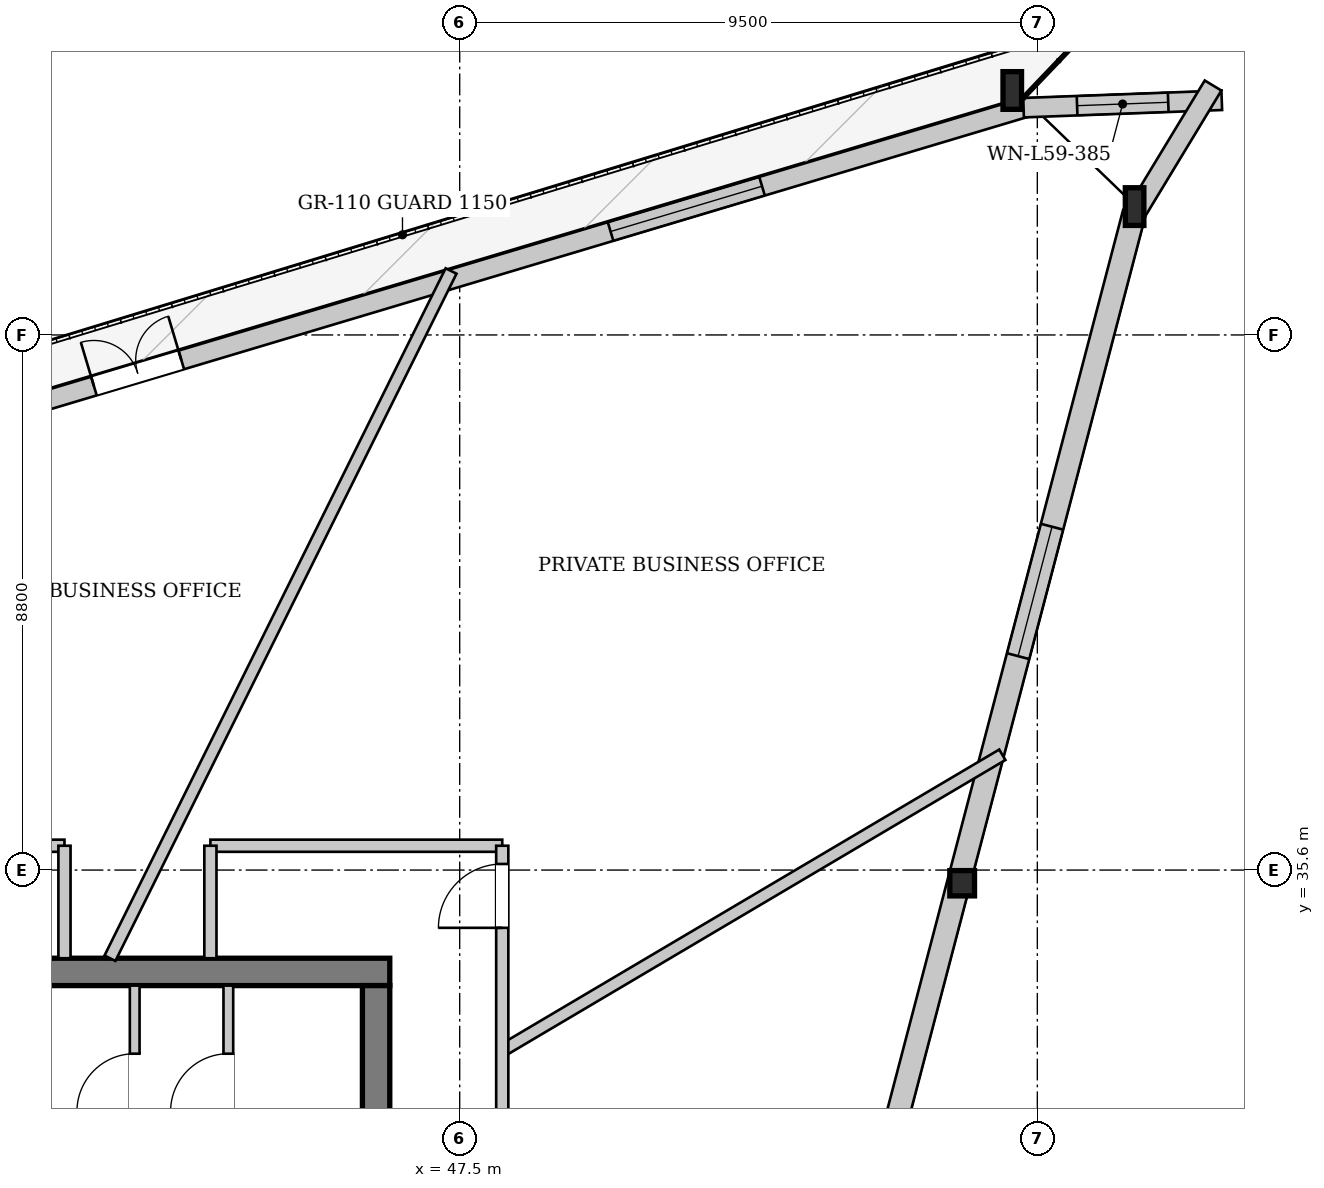
"""IFC4 building model, lengths in metres.
Left out: names, types, materials, properties, quantities, classifications, styles, units other than length and angle.
Written with IfcOpenShell. Run it as: python <this file> out.ifc"""

import sys

from ifc_helpers import new_model, si_unit, direction, frame, frame_2d, origin, origin_2d, place, context, subcontext, project, spatial, rectangle, i_section, extrude, source, transform, mapped, element, fill, save


model = new_model("IFC4")
c1 = context("Model", 3, precision=1e-05, world=origin(), true_north=direction((0.0, 1.0)))
c2 = subcontext(c1, "Body", "Model", "MODEL_VIEW")
j1 = project(units=[si_unit("LENGTHUNIT", "METRE"), si_unit("PLANEANGLEUNIT", "RADIAN")], contexts=[c1])
p1 = place(None, origin())
s1 = spatial("IfcSite", under=j1, at=p1, CompositionType="ELEMENT")
p2 = place(p1, origin())
s2 = spatial("IfcBuilding", under=s1, at=p2, CompositionType="ELEMENT")
p3 = place(p2, frame((0.0, 0.0, 223.8)))
s3 = spatial("IfcBuildingStorey", under=s2, at=p3, CompositionType="ELEMENT", Elevation=223.8)
m1 = source(origin(), c2, "Body", "SweptSolid", [
    extrude(i_section(OverallWidth=0.305, OverallDepth=0.62, WebThickness=0.021, FlangeThickness=0.04, at=origin_2d()), origin(), (0.0, 0.0, 1.0), 3.417),
])
p4 = place(p3, frame((58.778, 46.359, 0.0), z_axis=(-0.104447708162, 0.089016309418, 0.990538627676), x_axis=(-0.648645206746, -0.761090924769, 0.0)))
e1 = element("IfcColumn", 1, at=p4, inside=s3, PredefinedType="COLUMN", context=c2, shape_type="MappedRepresentation", body=[
    mapped(m1, transform((0.0, 0.0, 0.0), x_axis=(1.0, 0.0, 0.0), y_axis=(0.0, 1.0, 0.0), z_axis=(0.0, 0.0, 1.0), scale=1.0)),
])
m2 = source(origin(), c2, "Body", "SweptSolid", [
    extrude(i_section(OverallWidth=0.305, OverallDepth=0.62, WebThickness=0.021, FlangeThickness=0.04, at=origin_2d()), origin(), (0.0, 0.0, 1.0), 3.413),
])
p5 = place(p3, frame((56.767, 48.297, 0.0), z_axis=(-0.105156454528, 0.072178818108, 0.991832817711), x_axis=(-0.56590978088, -0.824467173333, 0.0)))
e2 = element("IfcColumn", 2, at=p5, inside=s3, PredefinedType="COLUMN", context=c2, shape_type="MappedRepresentation", body=[
    mapped(m2, transform((0.0, 0.0, 0.0), x_axis=(1.0, 0.0, 0.0), y_axis=(0.0, 1.0, 0.0), z_axis=(0.0, 0.0, 1.0), scale=1.0)),
])
m3 = source(origin(), c2, "Body", "SweptSolid", [
    extrude(i_section(OverallWidth=0.406, OverallDepth=0.416, WebThickness=0.027, FlangeThickness=0.042, at=origin_2d()), origin(), (0.0, 0.0, 1.0), 3.403),
])
p6 = place(p3, frame((55.865, 35.243, 0.0), z_axis=(-0.059266938757, 0.082370999628, 0.99483790056), x_axis=(-0.811722058131, -0.584043919875, 0.0)))
e3 = element("IfcColumn", 3, at=p6, inside=s3, PredefinedType="COLUMN", context=c2, shape_type="MappedRepresentation", body=[
    mapped(m3, transform((0.0, 0.0, 0.0), x_axis=(1.0, 0.0, 0.0), y_axis=(0.0, 1.0, 0.0), z_axis=(0.0, 0.0, 1.0), scale=1.0)),
])
p7 = place(p3, frame((35.328, 41.718, 0.0), z_axis=(0.0, 0.0, 1.0), x_axis=(0.958068349803, 0.286539765313, 0.0)))
e4 = element("IfcWall", 4, at=p7, inside=s3, PredefinedType="SOLIDWALL", context=c2, shape_type="SweptSolid", body=[
    extrude(rectangle(XDim=22.426, YDim=0.32, at=frame_2d((11.213, 0.0))), origin(), (0.0, 0.0, 1.0), 2.822),
])
p8 = place(p7, frame((6.426, 0.0, 0.0)))
e5 = element("IfcOpeningElement", 5, at=p8, cuts=e4, PredefinedType="OPENING", context=c2, shape_type="SweptSolid", body=[
    extrude(rectangle(XDim=1.5, YDim=2.3, at=frame_2d((0.75, 1.15))), frame((0.0, 0.17, 0.0), z_axis=(0.0, -1.0, 0.0), x_axis=(1.0, 0.0, 0.0)), (0.0, 0.0, 1.0), 0.34),
])
p9 = place(p7, frame((15.295, 0.0, 0.352)))
e6 = element("IfcOpeningElement", 6, at=p9, cuts=e4, PredefinedType="OPENING", context=c2, shape_type="SweptSolid", body=[
    extrude(rectangle(XDim=2.6, YDim=2.35, at=frame_2d((1.3, 1.175))), frame((0.0, 0.17, 0.0), z_axis=(0.0, -1.0, 0.0), x_axis=(1.0, 0.0, 0.0)), (0.0, 0.0, 1.0), 0.34),
])
p10 = place(p3, frame((56.773, 48.137, 0.0), z_axis=(0.0, 0.0, 1.0), x_axis=(0.999302372167, 0.03734660603, 0.0)))
e7 = element("IfcWall", 7, at=p10, inside=s3, PredefinedType="SOLIDWALL", context=c2, shape_type="SweptSolid", body=[
    extrude(rectangle(XDim=3.262, YDim=0.32, at=frame_2d((1.631, 0.0))), origin(), (0.0, 0.0, 1.0), 2.822),
])
p11 = place(p10, frame((0.881, 0.0, 0.402)))
e8 = element("IfcOpeningElement", 8, at=p11, cuts=e7, PredefinedType="OPENING", context=c2, shape_type="SweptSolid", body=[
    extrude(rectangle(XDim=1.5, YDim=2.3, at=frame_2d((0.75, 1.15))), frame((0.0, 0.17, 0.0), z_axis=(0.0, -1.0, 0.0), x_axis=(1.0, 0.0, 0.0)), (0.0, 0.0, 1.0), 0.34),
])
p12 = place(p3, frame((59.89, 48.502, 0.0), z_axis=(0.0, 0.0, 1.0), x_axis=(-0.518454432152, -0.855105257721, 0.0)))
e9 = element("IfcWall", 9, at=p12, inside=s3, PredefinedType="SOLIDWALL", context=c2, shape_type="SweptSolid", body=[
    extrude(rectangle(XDim=2.409, YDim=0.32, at=frame_2d((1.205, 0.0))), origin(), (0.0, 0.0, 1.0), 2.822),
])
p13 = place(p3, frame((58.594, 46.407, 0.0), z_axis=(0.0, 0.0, 1.0), x_axis=(-0.253530518145, -0.96732738841, 0.0)))
e10 = element("IfcWall", 10, at=p13, inside=s3, PredefinedType="SOLIDWALL", context=c2, shape_type="SweptSolid", body=[
    extrude(rectangle(XDim=22.982, YDim=0.38, at=frame_2d((11.491, 0.0))), origin(), (0.0, 0.0, 1.0), 2.822),
])
p14 = place(p13, frame((5.335, 0.0, 0.452)))
e11 = element("IfcOpeningElement", 11, at=p14, cuts=e10, PredefinedType="OPENING", context=c2, shape_type="SweptSolid", body=[
    extrude(rectangle(XDim=2.2, YDim=2.25, at=frame_2d((1.1, 1.125))), frame((0.0, 0.2, 0.0), z_axis=(0.0, -1.0, 0.0), x_axis=(1.0, 0.0, 0.0)), (0.0, 0.0, 1.0), 0.4),
])
p15 = place(p13, frame((15.447, 0.0, 0.452)))
e12 = element("IfcOpeningElement", 12, at=p15, cuts=e10, PredefinedType="OPENING", context=c2, shape_type="SweptSolid", body=[
    extrude(rectangle(XDim=2.2, YDim=2.25, at=frame_2d((1.1, 1.125))), frame((0.0, 0.2, 0.0), z_axis=(0.0, -1.0, 0.0), x_axis=(1.0, 0.0, 0.0)), (0.0, 0.0, 1.0), 0.4),
])
p16 = place(p3, frame((29.65, 33.925, 0.0), z_axis=(0.0, 0.0, 1.0), x_axis=(1.0, 0.0, 0.0)))
e13 = element("IfcWall", 13, at=p16, inside=s3, PredefinedType="SHEAR", context=c2, shape_type="SweptSolid", body=[
    extrude(rectangle(XDim=16.7, YDim=0.45, at=frame_2d((8.35, 0.0))), origin(), (0.0, 0.0, 1.0), 3.33),
])
p17 = place(p16, frame((1.45, 0.0, 0.0)))
e14 = element("IfcOpeningElement", 14, at=p17, cuts=e13, PredefinedType="OPENING", context=c2, shape_type="SweptSolid", body=[
    extrude(rectangle(XDim=0.95, YDim=2.1, at=frame_2d((0.475, 1.05))), frame((0.0, 0.235, 0.0), z_axis=(0.0, -1.0, 0.0), x_axis=(1.0, 0.0, 0.0)), (0.0, 0.0, 1.0), 0.47),
])
p18 = place(p16, frame((3.83, 0.0, 0.0)))
e15 = element("IfcOpeningElement", 15, at=p18, cuts=e13, PredefinedType="OPENING", context=c2, shape_type="SweptSolid", body=[
    extrude(rectangle(XDim=1.32, YDim=2.2, at=frame_2d((0.66, 1.1))), frame((0.0, 0.235, 0.0), z_axis=(0.0, -1.0, 0.0), x_axis=(1.0, 0.0, 0.0)), (0.0, 0.0, 1.0), 0.47),
])
p19 = place(p3, frame((46.125, 33.7, 0.0), z_axis=(0.0, 0.0, 1.0), x_axis=(0.0, -1.0, 0.0)))
e16 = element("IfcWall", 16, at=p19, inside=s3, PredefinedType="SHEAR", context=c2, shape_type="SweptSolid", body=[
    extrude(rectangle(XDim=14.2, YDim=0.45, at=frame_2d((7.1, 0.0))), origin(), (0.0, 0.0, 1.0), 3.33),
])
p20 = place(p19, frame((5.18, 0.0, 0.0)))
e17 = element("IfcOpeningElement", 17, at=p20, cuts=e16, PredefinedType="OPENING", context=c2, shape_type="SweptSolid", body=[
    extrude(rectangle(XDim=1.6, YDim=2.2, at=frame_2d((0.8, 1.1))), frame((0.0, 0.235, 0.0), z_axis=(0.0, -1.0, 0.0), x_axis=(1.0, 0.0, 0.0)), (0.0, 0.0, 1.0), 0.47),
])
p21 = place(p19, frame((2.05, 0.0, 0.0)))
e18 = element("IfcOpeningElement", 18, at=p21, cuts=e16, PredefinedType="OPENING", context=c2, shape_type="SweptSolid", body=[
    extrude(rectangle(XDim=0.95, YDim=2.1, at=frame_2d((0.475, 1.05))), frame((0.0, 0.235, 0.0), z_axis=(0.0, -1.0, 0.0), x_axis=(1.0, 0.0, 0.0)), (0.0, 0.0, 1.0), 0.47),
])
p22 = place(p3, frame((42.155, 30.68, 0.0), z_axis=(0.0, 0.0, 1.0), x_axis=(0.0, 1.0, 0.0)))
e19 = element("IfcWall", 19, at=p22, inside=s3, PredefinedType="PARTITIONING", context=c2, shape_type="SweptSolid", body=[
    extrude(rectangle(XDim=3.02, YDim=0.16, at=frame_2d((1.51, 0.0))), origin(), (0.0, 0.0, 1.0), 3.33),
])
p23 = place(p22, frame((0.95, 0.0, 0.0)))
e20 = element("IfcOpeningElement", 20, at=p23, cuts=e19, PredefinedType="OPENING", context=c2, shape_type="SweptSolid", body=[
    extrude(rectangle(XDim=0.95, YDim=2.1, at=frame_2d((0.475, 1.05))), frame((0.0, 0.09, 0.0), z_axis=(0.0, -1.0, 0.0), x_axis=(1.0, 0.0, 0.0)), (0.0, 0.0, 1.0), 0.18),
])
p24 = place(p3, frame((43.695, 30.68, 0.0), z_axis=(0.0, 0.0, 1.0), x_axis=(0.0, 1.0, 0.0)))
e21 = element("IfcWall", 21, at=p24, inside=s3, PredefinedType="PARTITIONING", context=c2, shape_type="SweptSolid", body=[
    extrude(rectangle(XDim=3.02, YDim=0.16, at=frame_2d((1.51, 0.0))), origin(), (0.0, 0.0, 1.0), 3.33),
])
p25 = place(p24, frame((0.95, 0.0, 0.0)))
e22 = element("IfcOpeningElement", 22, at=p25, cuts=e21, PredefinedType="OPENING", context=c2, shape_type="SweptSolid", body=[
    extrude(rectangle(XDim=0.95, YDim=2.1, at=frame_2d((0.475, 1.05))), frame((0.0, 0.09, 0.0), z_axis=(0.0, -1.0, 0.0), x_axis=(1.0, 0.0, 0.0)), (0.0, 0.0, 1.0), 0.18),
])
p26 = place(p3, frame((48.2, 32.632, 0.0), z_axis=(0.0, 0.0, 1.0), x_axis=(0.860740290166, 0.509044352571, 0.0)))
e23 = element("IfcWall", 23, at=p26, inside=s3, PredefinedType="PARTITIONING", context=c2, shape_type="SweptSolid", body=[
    extrude(rectangle(XDim=9.555, YDim=0.2, at=frame_2d((4.777, 0.0))), origin(), (0.0, 0.0, 1.0), 3.33),
])
p27 = place(p3, frame((41.748, 34.15, 0.0), z_axis=(0.0, 0.0, 1.0), x_axis=(0.44463448422, 0.895712105222, 0.0)))
e24 = element("IfcWall", 24, at=p27, inside=s3, PredefinedType="PARTITIONING", context=c2, shape_type="SweptSolid", body=[
    extrude(rectangle(XDim=12.618, YDim=0.2, at=frame_2d((6.309, 0.0))), origin(), (0.0, 0.0, 1.0), 3.33),
])
p28 = place(p3, frame((27.8, 36.0, 0.0), z_axis=(0.0, 0.0, 1.0), x_axis=(1.0, 0.0, 0.0)))
e25 = element("IfcWall", 25, at=p28, inside=s3, PredefinedType="PARTITIONING", context=c2, shape_type="SweptSolid", body=[
    extrude(rectangle(XDim=13.2, YDim=0.2, at=frame_2d((6.6, 0.0))), origin(), (0.0, 0.0, 1.0), 3.33),
])
p29 = place(p28, frame((11.85, 0.0, 0.0)))
e26 = element("IfcOpeningElement", 26, at=p29, cuts=e25, PredefinedType="OPENING", context=c2, shape_type="SweptSolid", body=[
    extrude(rectangle(XDim=1.05, YDim=2.2, at=frame_2d((0.525, 1.1))), frame((0.0, 0.11, 0.0), z_axis=(0.0, -1.0, 0.0), x_axis=(1.0, 0.0, 0.0)), (0.0, 0.0, 1.0), 0.22),
])
p30 = place(p28, frame((5.923, 0.0, 0.0)))
e27 = element("IfcOpeningElement", 27, at=p30, cuts=e25, PredefinedType="OPENING", context=c2, shape_type="SweptSolid", body=[
    extrude(rectangle(XDim=1.05, YDim=2.2, at=frame_2d((0.525, 1.1))), frame((0.0, 0.11, 0.0), z_axis=(0.0, -1.0, 0.0), x_axis=(1.0, 0.0, 0.0)), (0.0, 0.0, 1.0), 0.22),
])
p31 = place(p28, frame((0.3, 0.0, 0.0)))
e28 = element("IfcOpeningElement", 28, at=p31, cuts=e25, PredefinedType="OPENING", context=c2, shape_type="SweptSolid", body=[
    extrude(rectangle(XDim=1.05, YDim=2.2, at=frame_2d((0.525, 1.1))), frame((0.0, 0.11, 0.0), z_axis=(0.0, -1.0, 0.0), x_axis=(1.0, 0.0, 0.0)), (0.0, 0.0, 1.0), 0.22),
])
p32 = place(p3, frame((41.0, 34.15, 0.0), z_axis=(0.0, 0.0, 1.0), x_axis=(0.0, 1.0, 0.0)))
e29 = element("IfcWall", 29, at=p32, inside=s3, PredefinedType="PARTITIONING", context=c2, shape_type="SweptSolid", body=[
    extrude(rectangle(XDim=1.85, YDim=0.2, at=frame_2d((0.925, 0.0))), origin(), (0.0, 0.0, 1.0), 3.33),
])
p33 = place(p3, frame((43.4, 36.0, 0.0), z_axis=(0.0, 0.0, 1.0), x_axis=(1.0, 0.0, 0.0)))
e30 = element("IfcWall", 30, at=p33, inside=s3, PredefinedType="PARTITIONING", context=c2, shape_type="SweptSolid", body=[
    extrude(rectangle(XDim=4.8, YDim=0.2, at=frame_2d((2.4, 0.0))), origin(), (0.0, 0.0, 1.0), 3.33),
])
p34 = place(p3, frame((43.4, 34.15, 0.0), z_axis=(0.0, 0.0, 1.0), x_axis=(0.0, 1.0, 0.0)))
e31 = element("IfcWall", 31, at=p34, inside=s3, PredefinedType="PARTITIONING", context=c2, shape_type="SweptSolid", body=[
    extrude(rectangle(XDim=1.85, YDim=0.2, at=frame_2d((0.925, 0.0))), origin(), (0.0, 0.0, 1.0), 3.33),
])
p35 = place(p3, frame((48.2, 17.2, 0.0), z_axis=(0.0, 0.0, 1.0), x_axis=(0.0, 1.0, 0.0)))
e32 = element("IfcWall", 32, at=p35, inside=s3, PredefinedType="PARTITIONING", context=c2, shape_type="SweptSolid", body=[
    extrude(rectangle(XDim=18.8, YDim=0.2, at=frame_2d((9.4, 0.0))), origin(), (0.0, 0.0, 1.0), 3.015),
])
p36 = place(p35, frame((11.705, 0.0, 0.0)))
e33 = element("IfcOpeningElement", 33, at=p36, cuts=e32, PredefinedType="OPENING", context=c2, shape_type="SweptSolid", body=[
    extrude(rectangle(XDim=1.05, YDim=2.2, at=frame_2d((0.525, 1.1))), frame((0.0, 0.11, 0.0), z_axis=(0.0, -1.0, 0.0), x_axis=(1.0, 0.0, 0.0)), (0.0, 0.0, 1.0), 0.22),
])
p37 = place(p35, frame((17.45, 0.0, 0.0)))
e34 = element("IfcOpeningElement", 34, at=p37, cuts=e32, PredefinedType="OPENING", context=c2, shape_type="SweptSolid", body=[
    extrude(rectangle(XDim=1.05, YDim=2.2, at=frame_2d((0.525, 1.1))), frame((0.0, 0.11, 0.0), z_axis=(0.0, -1.0, 0.0), x_axis=(1.0, 0.0, 0.0)), (0.0, 0.0, 1.0), 0.22),
])
p38 = place(p35, frame((0.3, 0.0, 0.0)))
e35 = element("IfcOpeningElement", 35, at=p38, cuts=e32, PredefinedType="OPENING", context=c2, shape_type="SweptSolid", body=[
    extrude(rectangle(XDim=1.05, YDim=2.2, at=frame_2d((0.525, 1.1))), frame((0.0, 0.11, 0.0), z_axis=(0.0, -1.0, 0.0), x_axis=(1.0, 0.0, 0.0)), (0.0, 0.0, 1.0), 0.22),
])
p39 = place(p35, frame((4.377, 0.0, 0.0)))
e36 = element("IfcOpeningElement", 36, at=p39, cuts=e32, PredefinedType="OPENING", context=c2, shape_type="SweptSolid", body=[
    extrude(rectangle(XDim=0.9, YDim=2.1, at=frame_2d((0.45, 1.05))), frame((0.0, 0.11, 0.0), z_axis=(0.0, -1.0, 0.0), x_axis=(1.0, 0.0, 0.0)), (0.0, 0.0, 1.0), 0.22),
])
m4 = source(origin(), c2, "Body", "SweptSolid", [
    extrude(rectangle(XDim=1.5, YDim=2.3, at=frame_2d((0.75, 1.15))), frame((0.0, 0.025, 0.0), z_axis=(0.0, -1.0, 0.0), x_axis=(1.0, 0.0, 0.0)), (0.0, 0.0, 1.0), 0.05),
])
p40 = place(p8, origin())
e37 = element("IfcDoor", 37, at=p40, inside=s3, OperationType="DOUBLE_DOOR_SINGLE_SWING", PredefinedType="DOOR", context=c2, shape_type="MappedRepresentation", body=[
    mapped(m4, transform((0.0, 0.0, 0.0), x_axis=(1.0, 0.0, 0.0), y_axis=(0.0, 1.0, 0.0), z_axis=(0.0, 0.0, 1.0), scale=1.0)),
])
fill(e5, e37)
m5 = source(origin(), c2, "Body", "SweptSolid", [
    extrude(rectangle(XDim=2.6, YDim=2.35, at=frame_2d((1.3, 1.175))), frame((0.0, 0.03, 0.0), z_axis=(0.0, -1.0, 0.0), x_axis=(1.0, 0.0, 0.0)), (0.0, 0.0, 1.0), 0.06),
])
p41 = place(p9, origin())
e38 = element("IfcWindow", 38, at=p41, inside=s3, PartitioningType="SINGLE_PANEL", PredefinedType="WINDOW", context=c2, shape_type="MappedRepresentation", body=[
    mapped(m5, transform((0.0, 0.0, 0.0), x_axis=(1.0, 0.0, 0.0), y_axis=(0.0, 1.0, 0.0), z_axis=(0.0, 0.0, 1.0), scale=1.0)),
])
fill(e6, e38)
m6 = source(origin(), c2, "Body", "SweptSolid", [
    extrude(rectangle(XDim=1.5, YDim=2.3, at=frame_2d((0.75, 1.15))), frame((0.0, 0.03, 0.0), z_axis=(0.0, -1.0, 0.0), x_axis=(1.0, 0.0, 0.0)), (0.0, 0.0, 1.0), 0.06),
])
p42 = place(p11, origin())
e39 = element("IfcWindow", 39, at=p42, inside=s3, PartitioningType="SINGLE_PANEL", PredefinedType="WINDOW", context=c2, shape_type="MappedRepresentation", body=[
    mapped(m6, transform((0.0, 0.0, 0.0), x_axis=(1.0, 0.0, 0.0), y_axis=(0.0, 1.0, 0.0), z_axis=(0.0, 0.0, 1.0), scale=1.0)),
])
fill(e8, e39)
m7 = source(origin(), c2, "Body", "SweptSolid", [
    extrude(rectangle(XDim=2.2, YDim=2.25, at=frame_2d((1.1, 1.125))), frame((0.0, 0.03, 0.0), z_axis=(0.0, -1.0, 0.0), x_axis=(1.0, 0.0, 0.0)), (0.0, 0.0, 1.0), 0.06),
])
p43 = place(p14, origin())
e40 = element("IfcWindow", 40, at=p43, inside=s3, PartitioningType="SINGLE_PANEL", PredefinedType="WINDOW", context=c2, shape_type="MappedRepresentation", body=[
    mapped(m7, transform((0.0, 0.0, 0.0), x_axis=(1.0, 0.0, 0.0), y_axis=(0.0, 1.0, 0.0), z_axis=(0.0, 0.0, 1.0), scale=1.0)),
])
fill(e11, e40)
m8 = source(origin(), c2, "Body", "SweptSolid", [
    extrude(rectangle(XDim=0.95, YDim=2.1, at=frame_2d((0.475, 1.05))), frame((0.0, 0.025, 0.0), z_axis=(0.0, -1.0, 0.0), x_axis=(1.0, 0.0, 0.0)), (0.0, 0.0, 1.0), 0.05),
])
p44 = place(p23, origin())
e41 = element("IfcDoor", 41, at=p44, inside=s3, OperationType="SINGLE_SWING_LEFT", PredefinedType="DOOR", context=c2, shape_type="MappedRepresentation", body=[
    mapped(m8, transform((0.0, 0.0, 0.0), x_axis=(1.0, 0.0, 0.0), y_axis=(0.0, 1.0, 0.0), z_axis=(0.0, 0.0, 1.0), scale=1.0)),
])
fill(e20, e41)
p45 = place(p25, origin())
e42 = element("IfcDoor", 42, at=p45, inside=s3, OperationType="SINGLE_SWING_LEFT", PredefinedType="DOOR", context=c2, shape_type="MappedRepresentation", body=[
    mapped(m8, transform((0.0, 0.0, 0.0), x_axis=(1.0, 0.0, 0.0), y_axis=(0.0, 1.0, 0.0), z_axis=(0.0, 0.0, 1.0), scale=1.0)),
])
fill(e22, e42)
m9 = source(origin(), c2, "Body", "SweptSolid", [
    extrude(rectangle(XDim=1.05, YDim=2.2, at=frame_2d((0.525, 1.1))), frame((0.0, 0.025, 0.0), z_axis=(0.0, -1.0, 0.0), x_axis=(1.0, 0.0, 0.0)), (0.0, 0.0, 1.0), 0.05),
])
p46 = place(p37, origin())
e43 = element("IfcDoor", 43, at=p46, inside=s3, OperationType="SINGLE_SWING_LEFT", PredefinedType="DOOR", context=c2, shape_type="MappedRepresentation", body=[
    mapped(m9, transform((0.0, 0.0, 0.0), x_axis=(1.0, 0.0, 0.0), y_axis=(0.0, 1.0, 0.0), z_axis=(0.0, 0.0, 1.0), scale=1.0)),
])
fill(e34, e43)
save(model, sys.argv[1])
